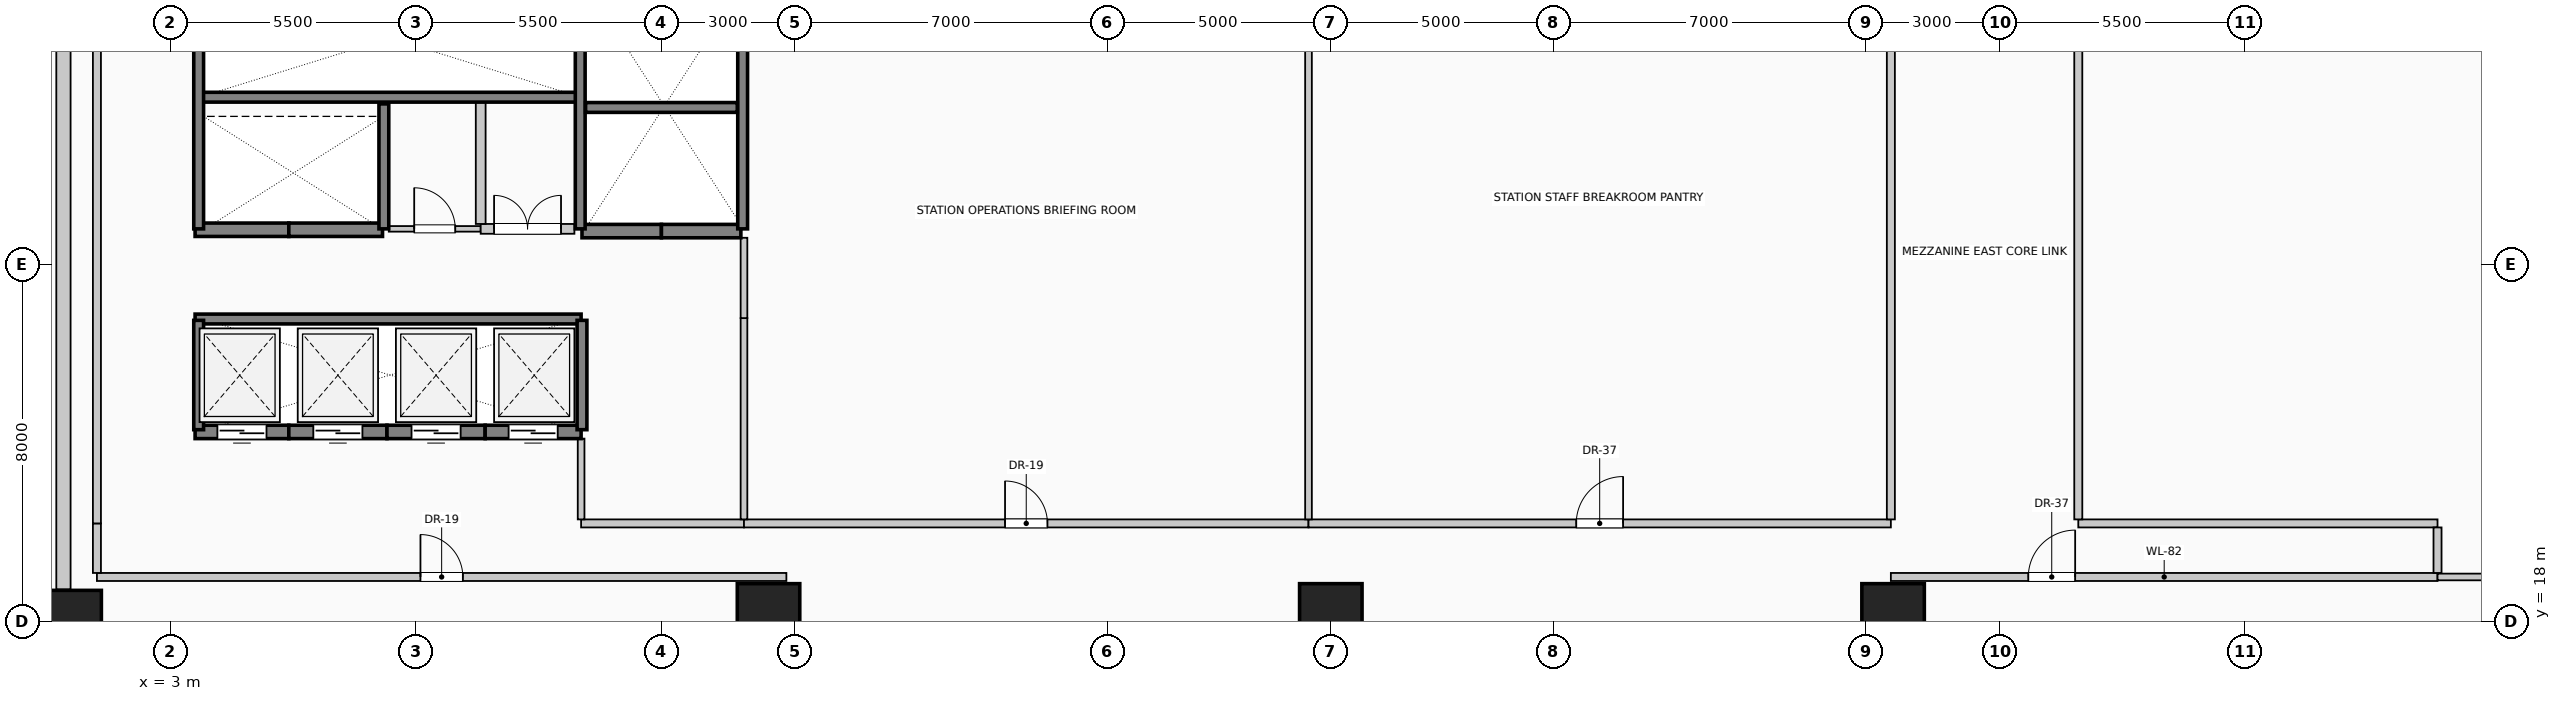
"""IFC4 building model, lengths in metres.
Left out: names, types, materials, properties, quantities, classifications, styles, units other than length and angle.
Written with IfcOpenShell. Run it as: python <this file> out.ifc"""

import sys

from ifc_helpers import new_model, si_unit, direction, frame, frame_2d, origin, origin_2d, place, context, subcontext, project, spatial, rectangle, extrude, element, fill, save


model = new_model("IFC4")
c1 = context("Model", 3, precision=1e-05, world=origin(), true_north=direction((0.0, 1.0)))
c2 = subcontext(c1, "Body", "Model", "MODEL_VIEW")
j1 = project(units=[si_unit("LENGTHUNIT", "METRE"), si_unit("PLANEANGLEUNIT", "RADIAN")], contexts=[c1])
p1 = place(None, origin())
s1 = spatial("IfcSite", under=j1, at=p1, CompositionType="ELEMENT")
p2 = place(p1, origin())
s2 = spatial("IfcBuilding", under=s1, at=p2, CompositionType="ELEMENT")
p3 = place(p2, frame((0.0, 0.0, 9.45)))
s3 = spatial("IfcBuildingStorey", under=s2, at=p3, CompositionType="ELEMENT", Elevation=9.45)
for number, where, z_axis, x_axis in (
    (1, (0.6, 18.0, 0.0), (0.0, 0.0, 1.0), (0.0, 1.0, 0.0)),
    (2, (16.4, 18.0, 0.0), (0.0, 0.0, 1.0), (1.0, 0.0, 0.0)),
    (3, (29.0, 18.0, 0.0), (0.0, 0.0, 1.0), (1.0, 0.0, 0.0)),
    (4, (41.6, 18.0, 0.0), (0.0, 0.0, 1.0), (1.0, 0.0, 0.0)),
):
    element("IfcColumn", number, at=place(p3, frame(where, z_axis=z_axis, x_axis=x_axis)), inside=s3, PredefinedType="COLUMN", context=c2, shape_type="SweptSolid", body=[
        extrude(rectangle(XDim=1.4, YDim=1.7, at=origin_2d()), origin(), (0.0, 0.0, 1.0), 4.05),
    ])
p4 = place(p3, frame((0.6, 18.72, 0.0), z_axis=(0.0, 0.0, 1.0), x_axis=(0.0, 1.0, 0.0)))
e5 = element("IfcWall", 5, at=p4, inside=s3, PredefinedType="SOLIDWALL", context=c2, shape_type="SweptSolid", body=[
    extrude(rectangle(XDim=14.56, YDim=0.32, at=frame_2d((7.28, 0.0))), origin(), (0.0, 0.0, 1.0), 2.7),
])
p5 = place(p3, frame((5.65, 22.25, 0.0), z_axis=(0.0, 0.0, 1.0), x_axis=(-1.0, 0.0, 0.0)))
e6 = element("IfcWall", 6, at=p5, inside=s3, PredefinedType="SOLIDWALL", context=c2, shape_type="SweptSolid", body=[
    extrude(rectangle(XDim=2.1, YDim=0.3, at=frame_2d((1.05, 0.0))), origin(), (0.0, 0.0, 1.0), 4.05),
])
p6 = place(p5, frame((0.5, 0.0, 0.0)))
e7 = element("IfcOpeningElement", 7, at=p6, cuts=e6, PredefinedType="OPENING", context=c2, shape_type="SweptSolid", body=[
    extrude(rectangle(XDim=1.1, YDim=2.2, at=frame_2d((0.55, 1.1))), frame((0.0, 0.16, 0.0), z_axis=(0.0, -1.0, 0.0), x_axis=(1.0, 0.0, 0.0)), (0.0, 0.0, 1.0), 0.32),
])
p7 = place(p3, frame((7.85, 22.25, 0.0), z_axis=(0.0, 0.0, 1.0), x_axis=(-1.0, 0.0, 0.0)))
e8 = element("IfcWall", 8, at=p7, inside=s3, PredefinedType="SOLIDWALL", context=c2, shape_type="SweptSolid", body=[
    extrude(rectangle(XDim=2.2, YDim=0.3, at=frame_2d((1.1, 0.0))), origin(), (0.0, 0.0, 1.0), 4.05),
])
p8 = place(p7, frame((0.55, 0.0, 0.0)))
e9 = element("IfcOpeningElement", 9, at=p8, cuts=e8, PredefinedType="OPENING", context=c2, shape_type="SweptSolid", body=[
    extrude(rectangle(XDim=1.1, YDim=2.2, at=frame_2d((0.55, 1.1))), frame((0.0, 0.16, 0.0), z_axis=(0.0, -1.0, 0.0), x_axis=(1.0, 0.0, 0.0)), (0.0, 0.0, 1.0), 0.32),
])
p9 = place(p3, frame((10.05, 22.25, 0.0), z_axis=(0.0, 0.0, 1.0), x_axis=(-1.0, 0.0, 0.0)))
e10 = element("IfcWall", 10, at=p9, inside=s3, PredefinedType="SOLIDWALL", context=c2, shape_type="SweptSolid", body=[
    extrude(rectangle(XDim=2.2, YDim=0.3, at=frame_2d((1.1, 0.0))), origin(), (0.0, 0.0, 1.0), 4.05),
])
p10 = place(p9, frame((0.55, 0.0, 0.0)))
e11 = element("IfcOpeningElement", 11, at=p10, cuts=e10, PredefinedType="OPENING", context=c2, shape_type="SweptSolid", body=[
    extrude(rectangle(XDim=1.1, YDim=2.2, at=frame_2d((0.55, 1.1))), frame((0.0, 0.16, 0.0), z_axis=(0.0, -1.0, 0.0), x_axis=(1.0, 0.0, 0.0)), (0.0, 0.0, 1.0), 0.32),
])
p11 = place(p3, frame((12.2, 22.25, 0.0), z_axis=(0.0, 0.0, 1.0), x_axis=(-1.0, 0.0, 0.0)))
e12 = element("IfcWall", 12, at=p11, inside=s3, PredefinedType="SOLIDWALL", context=c2, shape_type="SweptSolid", body=[
    extrude(rectangle(XDim=2.15, YDim=0.3, at=frame_2d((1.075, 0.0))), origin(), (0.0, 0.0, 1.0), 4.05),
])
p12 = place(p11, frame((0.525, 0.0, 0.0)))
e13 = element("IfcOpeningElement", 13, at=p12, cuts=e12, PredefinedType="OPENING", context=c2, shape_type="SweptSolid", body=[
    extrude(rectangle(XDim=1.1, YDim=2.2, at=frame_2d((0.55, 1.1))), frame((0.0, 0.16, 0.0), z_axis=(0.0, -1.0, 0.0), x_axis=(1.0, 0.0, 0.0)), (0.0, 0.0, 1.0), 0.32),
])
for number, where, z_axis, x_axis in (
    (14, (14.0, 26.75, 0.0), (0.0, 0.0, 1.0), (-1.0, 0.0, 0.0)),
    (15, (15.78, 26.75, 0.0), (0.0, 0.0, 1.0), (-1.0, 0.0, 0.0)),
):
    element("IfcWall", number, at=place(p3, frame(where, z_axis=z_axis, x_axis=x_axis)), inside=s3, PredefinedType="SOLIDWALL", context=c2, shape_type="SweptSolid", body=[
        extrude(rectangle(XDim=1.78, YDim=0.3, at=frame_2d((0.89, 0.0))), origin(), (0.0, 0.0, 1.0), 4.05),
    ])
p13 = place(p3, frame((5.65, 26.78, 0.0), z_axis=(0.0, 0.0, 1.0), x_axis=(-1.0, 0.0, 0.0)))
e16 = element("IfcWall", 16, at=p13, inside=s3, PredefinedType="SOLIDWALL", context=c2, shape_type="SweptSolid", body=[
    extrude(rectangle(XDim=2.1, YDim=0.3, at=frame_2d((1.05, 0.0))), origin(), (0.0, 0.0, 1.0), 4.05),
])
p14 = place(p3, frame((7.75, 26.78, 0.0), z_axis=(0.0, 0.0, 1.0), x_axis=(-1.0, 0.0, 0.0)))
e17 = element("IfcWall", 17, at=p14, inside=s3, PredefinedType="SOLIDWALL", context=c2, shape_type="SweptSolid", body=[
    extrude(rectangle(XDim=2.1, YDim=0.3, at=frame_2d((1.05, 0.0))), origin(), (0.0, 0.0, 1.0), 4.05),
])
p15 = place(p3, frame((3.55, 29.75, 0.0), z_axis=(0.0, 0.0, 1.0), x_axis=(1.0, 0.0, 0.0)))
e18 = element("IfcWall", 18, at=p15, inside=s3, PredefinedType="SOLIDWALL", context=c2, shape_type="SweptSolid", body=[
    extrude(rectangle(XDim=8.65, YDim=0.22, at=frame_2d((4.325, 0.0))), origin(), (0.0, 0.0, 1.0), 4.05),
])
p16 = place(p3, frame((3.63, 26.8, 0.0), z_axis=(0.0, 0.0, 1.0), x_axis=(0.0, 1.0, 0.0)))
e19 = element("IfcWall", 19, at=p16, inside=s3, PredefinedType="SOLIDWALL", context=c2, shape_type="SweptSolid", body=[
    extrude(rectangle(XDim=5.55, YDim=0.22, at=frame_2d((2.775, 0.0))), origin(), (0.0, 0.0, 1.0), 4.05),
])
p17 = place(p3, frame((7.78, 26.8, 0.0), z_axis=(0.0, 0.0, 1.0), x_axis=(0.0, 1.0, 0.0)))
e20 = element("IfcWall", 20, at=p17, inside=s3, PredefinedType="SOLIDWALL", context=c2, shape_type="SweptSolid", body=[
    extrude(rectangle(XDim=2.8, YDim=0.22, at=frame_2d((1.4, 0.0))), origin(), (0.0, 0.0, 1.0), 4.05),
])
for number, where, z_axis, x_axis in (
    (21, (12.18, 26.8, 0.0), (0.0, 0.0, 1.0), (0.0, 1.0, 0.0)),
    (22, (15.82, 26.8, 0.0), (0.0, 0.0, 1.0), (0.0, 1.0, 0.0)),
):
    element("IfcWall", number, at=place(p3, frame(where, z_axis=z_axis, x_axis=x_axis)), inside=s3, PredefinedType="SOLIDWALL", context=c2, shape_type="SweptSolid", body=[
        extrude(rectangle(XDim=5.45, YDim=0.22, at=frame_2d((2.725, 0.0))), origin(), (0.0, 0.0, 1.0), 4.05),
    ])
p18 = place(p3, frame((12.3, 29.52, 0.0), z_axis=(0.0, 0.0, 1.0), x_axis=(1.0, 0.0, 0.0)))
e23 = element("IfcWall", 23, at=p18, inside=s3, PredefinedType="SOLIDWALL", context=c2, shape_type="SweptSolid", body=[
    extrude(rectangle(XDim=3.4, YDim=0.22, at=frame_2d((1.7, 0.0))), origin(), (0.0, 0.0, 1.0), 4.05),
])
p19 = place(p3, frame((3.55, 24.78, 0.0), z_axis=(0.0, 0.0, 1.0), x_axis=(1.0, 0.0, 0.0)))
e24 = element("IfcWall", 24, at=p19, inside=s3, PredefinedType="SOLIDWALL", context=c2, shape_type="SweptSolid", body=[
    extrude(rectangle(XDim=8.65, YDim=0.22, at=frame_2d((4.325, 0.0))), origin(), (0.0, 0.0, 1.0), 4.05),
])
for number, where, z_axis, x_axis in (
    (25, (3.63, 22.3, 0.0), (0.0, 0.0, 1.0), (0.0, 1.0, 0.0)),
    (26, (12.22, 22.3, 0.0), (0.0, 0.0, 1.0), (0.0, 1.0, 0.0)),
):
    element("IfcWall", number, at=place(p3, frame(where, z_axis=z_axis, x_axis=x_axis)), inside=s3, PredefinedType="SOLIDWALL", context=c2, shape_type="SweptSolid", body=[
        extrude(rectangle(XDim=2.45, YDim=0.22, at=frame_2d((1.225, 0.0))), origin(), (0.0, 0.0, 1.0), 4.05),
    ])
p20 = place(p3, frame((1.35, 19.0, 0.0), z_axis=(0.0, 0.0, 1.0), x_axis=(1.0, 0.0, 0.0)))
e27 = element("IfcWall", 27, at=p20, inside=s3, PredefinedType="PARTITIONING", context=c2, shape_type="SweptSolid", body=[
    extrude(rectangle(XDim=15.45, YDim=0.18, at=frame_2d((7.725, 0.0))), origin(), (0.0, 0.0, 1.0), 3.65),
])
p21 = place(p20, frame((7.25, 0.0, 0.0)))
e28 = element("IfcOpeningElement", 28, at=p21, cuts=e27, PredefinedType="OPENING", context=c2, shape_type="SweptSolid", body=[
    extrude(rectangle(XDim=0.95, YDim=2.15, at=frame_2d((0.475, 1.075))), frame((0.0, 0.1, 0.0), z_axis=(0.0, -1.0, 0.0), x_axis=(1.0, 0.0, 0.0)), (0.0, 0.0, 1.0), 0.2),
])
p22 = place(p3, frame((41.55, 19.0, 0.0), z_axis=(0.0, 0.0, 1.0), x_axis=(1.0, 0.0, 0.0)))
e29 = element("IfcWall", 29, at=p22, inside=s3, PredefinedType="PARTITIONING", context=c2, shape_type="SweptSolid", body=[
    extrude(rectangle(XDim=12.25, YDim=0.18, at=frame_2d((6.125, 0.0))), origin(), (0.0, 0.0, 1.0), 3.65),
])
p23 = place(p22, frame((3.08, 0.0, 0.0)))
e30 = element("IfcOpeningElement", 30, at=p23, cuts=e29, PredefinedType="OPENING", context=c2, shape_type="SweptSolid", body=[
    extrude(rectangle(XDim=1.05, YDim=2.15, at=frame_2d((0.525, 1.075))), frame((0.0, 0.1, 0.0), z_axis=(0.0, -1.0, 0.0), x_axis=(1.0, 0.0, 0.0)), (0.0, 0.0, 1.0), 0.2),
])
p24 = place(p3, frame((53.8, 19.0, 0.0), z_axis=(0.0, 0.0, 1.0), x_axis=(1.0, 0.0, 0.0)))
e31 = element("IfcWall", 31, at=p24, inside=s3, PredefinedType="PARTITIONING", context=c2, shape_type="SweptSolid", body=[
    extrude(rectangle(XDim=3.44, YDim=0.15, at=frame_2d((1.72, 0.0))), origin(), (0.0, 0.0, 1.0), 3.65),
])
p25 = place(p3, frame((12.2, 20.2, 0.0), z_axis=(0.0, 0.0, 1.0), x_axis=(1.0, 0.0, 0.0)))
e32 = element("IfcWall", 32, at=p25, inside=s3, PredefinedType="PARTITIONING", context=c2, shape_type="SweptSolid", body=[
    extrude(rectangle(XDim=3.65, YDim=0.18, at=frame_2d((1.825, 0.0))), origin(), (0.0, 0.0, 1.0), 3.65),
])
p26 = place(p3, frame((15.85, 20.2, 0.0), z_axis=(0.0, 0.0, 1.0), x_axis=(1.0, 0.0, 0.0)))
e33 = element("IfcWall", 33, at=p26, inside=s3, PredefinedType="PARTITIONING", context=c2, shape_type="SweptSolid", body=[
    extrude(rectangle(XDim=12.65, YDim=0.18, at=frame_2d((6.325, 0.0))), origin(), (0.0, 0.0, 1.0), 3.65),
])
p27 = place(p26, frame((5.85, 0.0, 0.0)))
e34 = element("IfcOpeningElement", 34, at=p27, cuts=e33, PredefinedType="OPENING", context=c2, shape_type="SweptSolid", body=[
    extrude(rectangle(XDim=0.95, YDim=2.15, at=frame_2d((0.475, 1.075))), frame((0.0, 0.1, 0.0), z_axis=(0.0, -1.0, 0.0), x_axis=(1.0, 0.0, 0.0)), (0.0, 0.0, 1.0), 0.2),
])
p28 = place(p3, frame((28.5, 20.2, 0.0), z_axis=(0.0, 0.0, 1.0), x_axis=(1.0, 0.0, 0.0)))
e35 = element("IfcWall", 35, at=p28, inside=s3, PredefinedType="PARTITIONING", context=c2, shape_type="SweptSolid", body=[
    extrude(rectangle(XDim=13.05, YDim=0.18, at=frame_2d((6.525, 0.0))), origin(), (0.0, 0.0, 1.0), 3.65),
])
p29 = place(p28, frame((6.0, 0.0, 0.0)))
e36 = element("IfcOpeningElement", 36, at=p29, cuts=e35, PredefinedType="OPENING", context=c2, shape_type="SweptSolid", body=[
    extrude(rectangle(XDim=1.05, YDim=2.15, at=frame_2d((0.525, 1.075))), frame((0.0, 0.1, 0.0), z_axis=(0.0, -1.0, 0.0), x_axis=(1.0, 0.0, 0.0)), (0.0, 0.0, 1.0), 0.2),
])
p30 = place(p3, frame((45.75, 20.2, 0.0), z_axis=(0.0, 0.0, 1.0), x_axis=(1.0, 0.0, 0.0)))
e37 = element("IfcWall", 37, at=p30, inside=s3, PredefinedType="PARTITIONING", context=c2, shape_type="SweptSolid", body=[
    extrude(rectangle(XDim=8.05, YDim=0.18, at=frame_2d((4.025, 0.0))), origin(), (0.0, 0.0, 1.0), 3.65),
])
p31 = place(p3, frame((7.89, 26.8, 0.0), z_axis=(0.0, 0.0, 1.0), x_axis=(1.0, 0.0, 0.0)))
e38 = element("IfcWall", 38, at=p31, inside=s3, PredefinedType="PARTITIONING", context=c2, shape_type="SweptSolid", body=[
    extrude(rectangle(XDim=2.06, YDim=0.125, at=frame_2d((1.03, 0.0))), origin(), (0.0, 0.0, 1.0), 3.65),
])
p32 = place(p31, frame((0.57, 0.0, 0.0)))
e39 = element("IfcOpeningElement", 39, at=p32, cuts=e38, PredefinedType="OPENING", context=c2, shape_type="SweptSolid", body=[
    extrude(rectangle(XDim=0.92, YDim=2.1, at=frame_2d((0.46, 1.05))), frame((0.0, 0.073, 0.0), z_axis=(0.0, -1.0, 0.0), x_axis=(1.0, 0.0, 0.0)), (0.0, 0.0, 1.0), 0.145),
])
p33 = place(p3, frame((9.95, 26.8, 0.0), z_axis=(0.0, 0.0, 1.0), x_axis=(1.0, 0.0, 0.0)))
e40 = element("IfcWall", 40, at=p33, inside=s3, PredefinedType="PARTITIONING", context=c2, shape_type="SweptSolid", body=[
    extrude(rectangle(XDim=2.1, YDim=0.22, at=frame_2d((1.05, 0.0))), origin(), (0.0, 0.0, 1.0), 3.65),
])
p34 = place(p33, frame((0.3, 0.0, 0.0)))
e41 = element("IfcOpeningElement", 41, at=p34, cuts=e40, PredefinedType="OPENING", context=c2, shape_type="SweptSolid", body=[
    extrude(rectangle(XDim=1.5, YDim=2.25, at=frame_2d((0.75, 1.125))), frame((0.0, 0.12, 0.0), z_axis=(0.0, -1.0, 0.0), x_axis=(1.0, 0.0, 0.0)), (0.0, 0.0, 1.0), 0.24),
])
p35 = place(p3, frame((1.35, 19.09, 0.0), z_axis=(0.0, 0.0, 1.0), x_axis=(0.0, 1.0, 0.0)))
e42 = element("IfcWall", 42, at=p35, inside=s3, PredefinedType="PARTITIONING", context=c2, shape_type="SweptSolid", body=[
    extrude(rectangle(XDim=1.11, YDim=0.18, at=frame_2d((0.555, 0.0))), origin(), (0.0, 0.0, 1.0), 3.65),
])
p36 = place(p3, frame((1.35, 20.2, 0.0), z_axis=(0.0, 0.0, 1.0), x_axis=(0.0, 1.0, 0.0)))
e43 = element("IfcWall", 43, at=p36, inside=s3, PredefinedType="PARTITIONING", context=c2, shape_type="SweptSolid", body=[
    extrude(rectangle(XDim=13.1, YDim=0.18, at=frame_2d((6.55, 0.0))), origin(), (0.0, 0.0, 1.0), 3.65),
])
p37 = place(p3, frame((9.95, 26.91, 0.0), z_axis=(0.0, 0.0, 1.0), x_axis=(0.0, 1.0, 0.0)))
e44 = element("IfcWall", 44, at=p37, inside=s3, PredefinedType="PARTITIONING", context=c2, shape_type="SweptSolid", body=[
    extrude(rectangle(XDim=2.73, YDim=0.22, at=frame_2d((1.365, 0.0))), origin(), (0.0, 0.0, 1.0), 3.65),
])
p38 = place(p3, frame((12.2, 20.29, 0.0), z_axis=(0.0, 0.0, 1.0), x_axis=(0.0, 1.0, 0.0)))
e45 = element("IfcWall", 45, at=p38, inside=s3, PredefinedType="PARTITIONING", context=c2, shape_type="SweptSolid", body=[
    extrude(rectangle(XDim=1.81, YDim=0.15, at=frame_2d((0.905, 0.0))), origin(), (0.0, 0.0, 1.0), 3.65),
])
p39 = place(p3, frame((15.85, 20.29, 0.0), z_axis=(0.0, 0.0, 1.0), x_axis=(0.0, 1.0, 0.0)))
e46 = element("IfcWall", 46, at=p39, inside=s3, PredefinedType="PARTITIONING", context=c2, shape_type="SweptSolid", body=[
    extrude(rectangle(XDim=4.51, YDim=0.15, at=frame_2d((2.255, 0.0))), origin(), (0.0, 0.0, 1.0), 3.65),
])
p40 = place(p3, frame((15.85, 24.8, 0.0), z_axis=(0.0, 0.0, 1.0), x_axis=(0.0, 1.0, 0.0)))
e47 = element("IfcWall", 47, at=p40, inside=s3, PredefinedType="PARTITIONING", context=c2, shape_type="SweptSolid", body=[
    extrude(rectangle(XDim=1.8, YDim=0.15, at=frame_2d((0.9, 0.0))), origin(), (0.0, 0.0, 1.0), 3.65),
])
p41 = place(p3, frame((28.5, 20.29, 0.0), z_axis=(0.0, 0.0, 1.0), x_axis=(0.0, 1.0, 0.0)))
e48 = element("IfcWall", 48, at=p41, inside=s3, PredefinedType="PARTITIONING", context=c2, shape_type="SweptSolid", body=[
    extrude(rectangle(XDim=12.86, YDim=0.15, at=frame_2d((6.43, 0.0))), origin(), (0.0, 0.0, 1.0), 3.65),
])
p42 = place(p3, frame((41.55, 20.29, 0.0), z_axis=(0.0, 0.0, 1.0), x_axis=(0.0, 1.0, 0.0)))
e49 = element("IfcWall", 49, at=p42, inside=s3, PredefinedType="PARTITIONING", context=c2, shape_type="SweptSolid", body=[
    extrude(rectangle(XDim=12.06, YDim=0.18, at=frame_2d((6.03, 0.0))), origin(), (0.0, 0.0, 1.0), 2.695),
])
p43 = place(p3, frame((45.75, 20.29, 0.0), z_axis=(0.0, 0.0, 1.0), x_axis=(0.0, 1.0, 0.0)))
e50 = element("IfcWall", 50, at=p43, inside=s3, PredefinedType="PARTITIONING", context=c2, shape_type="SweptSolid", body=[
    extrude(rectangle(XDim=11.985, YDim=0.18, at=frame_2d((5.992, 0.0))), origin(), (0.0, 0.0, 1.0), 3.65),
])
p44 = place(p3, frame((53.8, 19.09, 0.0), z_axis=(0.0, 0.0, 1.0), x_axis=(0.0, 1.0, 0.0)))
e51 = element("IfcWall", 51, at=p44, inside=s3, PredefinedType="PARTITIONING", context=c2, shape_type="SweptSolid", body=[
    extrude(rectangle(XDim=1.02, YDim=0.18, at=frame_2d((0.51, 0.0))), origin(), (0.0, 0.0, 1.0), 3.65),
])
p45 = place(p6, origin())
e52 = element("IfcDoor", 52, at=p45, inside=s3, OperationType="SLIDING_TO_LEFT", PredefinedType="DOOR", context=c2, shape_type="SweptSolid", body=[
    extrude(rectangle(XDim=1.1, YDim=2.2, at=frame_2d((0.55, 1.1))), frame((0.0, 0.025, 0.0), z_axis=(0.0, -1.0, 0.0), x_axis=(1.0, 0.0, 0.0)), (0.0, 0.0, 1.0), 0.05),
])
fill(e7, e52)
p46 = place(p8, origin())
e53 = element("IfcDoor", 53, at=p46, inside=s3, OperationType="SLIDING_TO_RIGHT", PredefinedType="DOOR", context=c2, shape_type="SweptSolid", body=[
    extrude(rectangle(XDim=1.1, YDim=2.2, at=frame_2d((0.55, 1.1))), frame((0.0, 0.025, 0.0), z_axis=(0.0, -1.0, 0.0), x_axis=(1.0, 0.0, 0.0)), (0.0, 0.0, 1.0), 0.05),
])
fill(e9, e53)
p47 = place(p10, origin())
e54 = element("IfcDoor", 54, at=p47, inside=s3, OperationType="SLIDING_TO_LEFT", PredefinedType="DOOR", context=c2, shape_type="SweptSolid", body=[
    extrude(rectangle(XDim=1.1, YDim=2.2, at=frame_2d((0.55, 1.1))), frame((0.0, 0.025, 0.0), z_axis=(0.0, -1.0, 0.0), x_axis=(1.0, 0.0, 0.0)), (0.0, 0.0, 1.0), 0.05),
])
fill(e11, e54)
p48 = place(p12, origin())
e55 = element("IfcDoor", 55, at=p48, inside=s3, OperationType="SLIDING_TO_RIGHT", PredefinedType="DOOR", context=c2, shape_type="SweptSolid", body=[
    extrude(rectangle(XDim=1.1, YDim=2.2, at=frame_2d((0.55, 1.1))), frame((0.0, 0.025, 0.0), z_axis=(0.0, -1.0, 0.0), x_axis=(1.0, 0.0, 0.0)), (0.0, 0.0, 1.0), 0.05),
])
fill(e13, e55)
p49 = place(p21, origin())
e56 = element("IfcDoor", 56, at=p49, inside=s3, OperationType="SINGLE_SWING_LEFT", PredefinedType="DOOR", context=c2, shape_type="SweptSolid", body=[
    extrude(rectangle(XDim=0.95, YDim=2.15, at=frame_2d((0.475, 1.075))), frame((0.0, 0.025, 0.0), z_axis=(0.0, -1.0, 0.0), x_axis=(1.0, 0.0, 0.0)), (0.0, 0.0, 1.0), 0.05),
])
fill(e28, e56)
p50 = place(p23, origin())
e57 = element("IfcDoor", 57, at=p50, inside=s3, OperationType="SINGLE_SWING_RIGHT", PredefinedType="DOOR", context=c2, shape_type="SweptSolid", body=[
    extrude(rectangle(XDim=1.05, YDim=2.15, at=frame_2d((0.525, 1.075))), frame((0.0, 0.025, 0.0), z_axis=(0.0, -1.0, 0.0), x_axis=(1.0, 0.0, 0.0)), (0.0, 0.0, 1.0), 0.05),
])
fill(e30, e57)
p51 = place(p27, origin())
e58 = element("IfcDoor", 58, at=p51, inside=s3, OperationType="SINGLE_SWING_LEFT", PredefinedType="DOOR", context=c2, shape_type="SweptSolid", body=[
    extrude(rectangle(XDim=0.95, YDim=2.15, at=frame_2d((0.475, 1.075))), frame((0.0, 0.025, 0.0), z_axis=(0.0, -1.0, 0.0), x_axis=(1.0, 0.0, 0.0)), (0.0, 0.0, 1.0), 0.05),
])
fill(e34, e58)
p52 = place(p29, origin())
e59 = element("IfcDoor", 59, at=p52, inside=s3, OperationType="SINGLE_SWING_RIGHT", PredefinedType="DOOR", context=c2, shape_type="SweptSolid", body=[
    extrude(rectangle(XDim=1.05, YDim=2.15, at=frame_2d((0.525, 1.075))), frame((0.0, 0.025, 0.0), z_axis=(0.0, -1.0, 0.0), x_axis=(1.0, 0.0, 0.0)), (0.0, 0.0, 1.0), 0.05),
])
fill(e36, e59)
p53 = place(p32, origin())
e60 = element("IfcDoor", 60, at=p53, inside=s3, OperationType="SINGLE_SWING_LEFT", PredefinedType="DOOR", context=c2, shape_type="SweptSolid", body=[
    extrude(rectangle(XDim=0.92, YDim=2.1, at=frame_2d((0.46, 1.05))), frame((0.0, 0.025, 0.0), z_axis=(0.0, -1.0, 0.0), x_axis=(1.0, 0.0, 0.0)), (0.0, 0.0, 1.0), 0.05),
])
fill(e39, e60)
p54 = place(p34, origin())
e61 = element("IfcDoor", 61, at=p54, inside=s3, OperationType="DOUBLE_DOOR_SINGLE_SWING", PredefinedType="DOOR", context=c2, shape_type="SweptSolid", body=[
    extrude(rectangle(XDim=1.5, YDim=2.25, at=frame_2d((0.75, 1.125))), frame((0.0, 0.025, 0.0), z_axis=(0.0, -1.0, 0.0), x_axis=(1.0, 0.0, 0.0)), (0.0, 0.0, 1.0), 0.05),
])
fill(e41, e61)
save(model, sys.argv[1])
